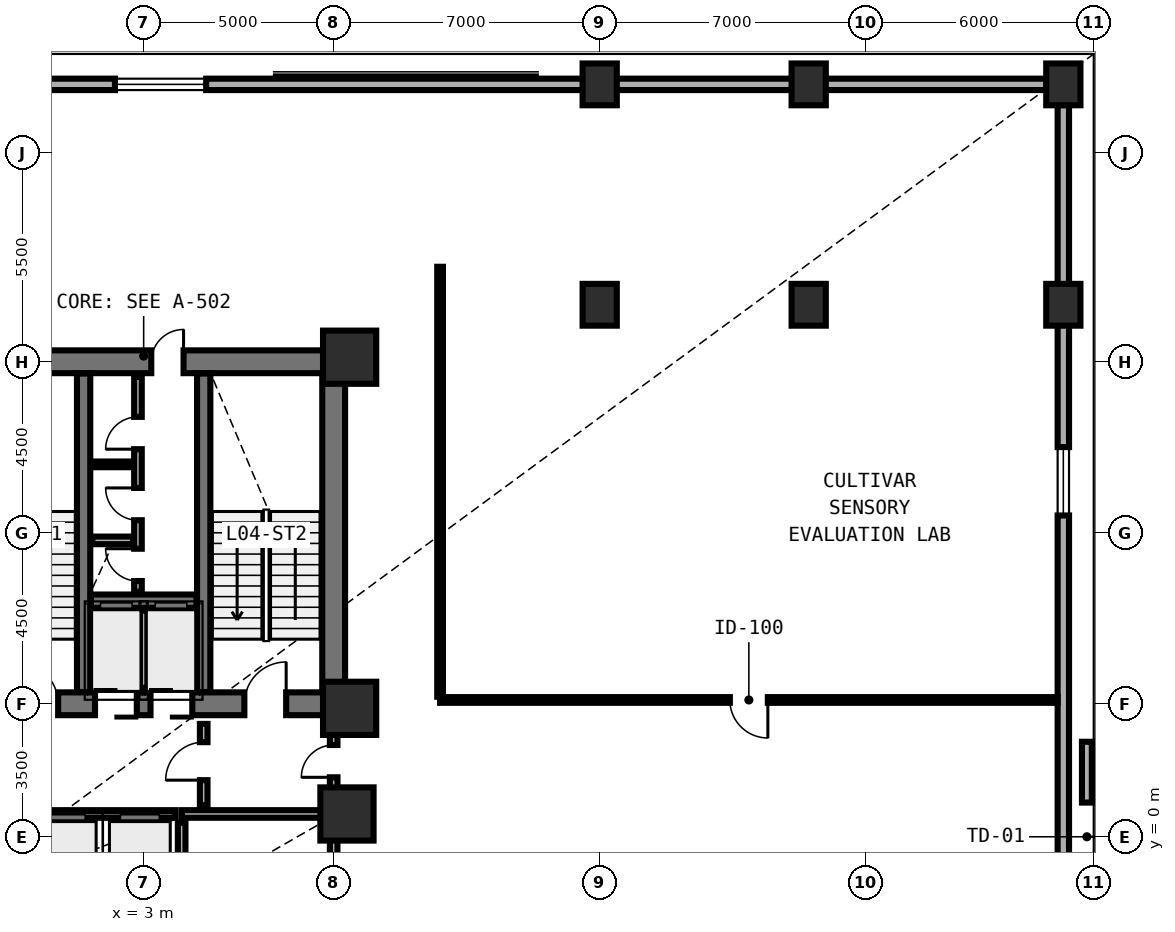
"""IFC4 building model, lengths in metres.
Left out: names, types, materials, properties, quantities, classifications, styles, units other than length and angle.
Written with IfcOpenShell. Run it as: python <this file> out.ifc"""

import sys

from ifc_helpers import new_model, si_unit, direction, frame, frame_2d, origin, origin_2d, place, context, subcontext, project, spatial, rectangle, extrude, element, fill, save


model = new_model("IFC4")
c1 = context("Model", 3, precision=1e-05, world=origin(), true_north=direction((0.0, 1.0)))
c2 = subcontext(c1, "Body", "Model", "MODEL_VIEW")
j1 = project(units=[si_unit("LENGTHUNIT", "METRE"), si_unit("PLANEANGLEUNIT", "RADIAN")], contexts=[c1])
p1 = place(None, origin())
s1 = spatial("IfcSite", under=j1, at=p1, CompositionType="ELEMENT")
p2 = place(p1, origin())
s2 = spatial("IfcBuilding", under=s1, at=p2, CompositionType="ELEMENT")
p3 = place(p2, frame((0.0, 0.0, 18.4)))
s3 = spatial("IfcBuildingStorey", under=s2, at=p3, CompositionType="ELEMENT", Elevation=18.4)
p4 = place(p3, frame((-2.0, 3.5, 0.0), z_axis=(0.0, 0.0, 1.0), x_axis=(1.0, 0.0, 0.0)))
e1 = element("IfcWall", 1, at=p4, inside=s3, PredefinedType="SHEAR", context=c2, shape_type="SweptSolid", body=[
    extrude(rectangle(XDim=10.0, YDim=0.6, at=frame_2d((5.0, 0.0))), origin(), (0.0, 0.0, 1.0), 4.592),
])
p5 = place(p4, frame((1.65, 0.0, 0.0)))
e2 = element("IfcOpeningElement", 2, at=p5, cuts=e1, PredefinedType="OPENING", context=c2, shape_type="SweptSolid", body=[
    extrude(rectangle(XDim=1.1, YDim=2.15, at=frame_2d((0.55, 1.075))), frame((0.0, 0.31, 0.0), z_axis=(0.0, -1.0, 0.0), x_axis=(1.0, 0.0, 0.0)), (0.0, 0.0, 1.0), 0.62),
])
p6 = place(p4, frame((7.65, 0.0, 0.0)))
e3 = element("IfcOpeningElement", 3, at=p6, cuts=e1, PredefinedType="OPENING", context=c2, shape_type="SweptSolid", body=[
    extrude(rectangle(XDim=1.1, YDim=2.15, at=frame_2d((0.55, 1.075))), frame((0.0, 0.31, 0.0), z_axis=(0.0, -1.0, 0.0), x_axis=(1.0, 0.0, 0.0)), (0.0, 0.0, 1.0), 0.62),
])
p7 = place(p4, frame((3.72, 0.0, 0.0)))
e4 = element("IfcOpeningElement", 4, at=p7, cuts=e1, PredefinedType="OPENING", context=c2, shape_type="SweptSolid", body=[
    extrude(rectangle(XDim=1.1, YDim=2.2, at=frame_2d((0.55, 1.1))), frame((0.0, 0.31, 0.0), z_axis=(0.0, -1.0, 0.0), x_axis=(1.0, 0.0, 0.0)), (0.0, 0.0, 1.0), 0.62),
])
p8 = place(p4, frame((5.18, 0.0, 0.0)))
e5 = element("IfcOpeningElement", 5, at=p8, cuts=e1, PredefinedType="OPENING", context=c2, shape_type="SweptSolid", body=[
    extrude(rectangle(XDim=1.1, YDim=2.2, at=frame_2d((0.55, 1.1))), frame((0.0, 0.31, 0.0), z_axis=(0.0, -1.0, 0.0), x_axis=(1.0, 0.0, 0.0)), (0.0, 0.0, 1.0), 0.62),
])
p9 = place(p3, frame((-2.0, 12.5, 0.0), z_axis=(0.0, 0.0, 1.0), x_axis=(1.0, 0.0, 0.0)))
e6 = element("IfcWall", 6, at=p9, inside=s3, PredefinedType="SHEAR", context=c2, shape_type="SweptSolid", body=[
    extrude(rectangle(XDim=10.0, YDim=0.6, at=frame_2d((5.0, 0.0))), origin(), (0.0, 0.0, 1.0), 4.592),
])
p10 = place(p9, frame((5.2, 0.0, 0.0)))
e7 = element("IfcOpeningElement", 7, at=p10, cuts=e6, PredefinedType="OPENING", context=c2, shape_type="SweptSolid", body=[
    extrude(rectangle(XDim=0.85, YDim=2.1, at=frame_2d((0.425, 1.05))), frame((0.0, 0.31, 0.0), z_axis=(0.0, -1.0, 0.0), x_axis=(1.0, 0.0, 0.0)), (0.0, 0.0, 1.0), 0.62),
])
p11 = place(p3, frame((8.0, 3.81, 0.0), z_axis=(0.0, 0.0, 1.0), x_axis=(0.0, 1.0, 0.0)))
e8 = element("IfcWall", 8, at=p11, inside=s3, PredefinedType="SHEAR", context=c2, shape_type="SweptSolid", body=[
    extrude(rectangle(XDim=8.38, YDim=0.6, at=frame_2d((4.19, 0.0))), origin(), (0.0, 0.0, 1.0), 4.592),
])
for number, where, z_axis, x_axis in (
    (9, (1.42, 3.81, 0.0), (0.0, 0.0, 1.0), (0.0, 1.0, 0.0)),
    (10, (4.58, 3.81, 0.0), (0.0, 0.0, 1.0), (0.0, 1.0, 0.0)),
):
    element("IfcWall", number, at=place(p3, frame(where, z_axis=z_axis, x_axis=x_axis)), inside=s3, PredefinedType="SHEAR", context=c2, shape_type="SweptSolid", body=[
        extrude(rectangle(XDim=8.38, YDim=0.35, at=frame_2d((4.19, 0.0))), origin(), (0.0, 0.0, 1.0), 4.592),
    ])
p12 = place(p3, frame((1.61, 6.2, 0.0), z_axis=(0.0, 0.0, 1.0), x_axis=(1.0, 0.0, 0.0)))
e11 = element("IfcWall", 11, at=p12, inside=s3, PredefinedType="SHEAR", context=c2, shape_type="SweptSolid", body=[
    extrude(rectangle(XDim=2.78, YDim=0.35, at=frame_2d((1.39, 0.0))), origin(), (0.0, 0.0, 1.0), 4.592),
])
for number, where, z_axis, x_axis in (
    (12, (8.42, 12.62, 0.0), (0.0, 0.0, 1.0), (1.0, 0.0, 0.0)),
    (13, (8.42, 3.38, 0.0), (0.0, 0.0, 1.0), (1.0, 0.0, 0.0)),
    (14, (8.35, 0.6, 0.0), (0.0, 0.0, 1.0), (1.0, 0.0, 0.0)),
):
    element("IfcColumn", number, at=place(p3, frame(where, z_axis=z_axis, x_axis=x_axis)), inside=s3, PredefinedType="COLUMN", context=c2, shape_type="SweptSolid", body=[
        extrude(rectangle(XDim=1.4, YDim=1.4, at=origin_2d()), origin(), (0.0, 0.0, 1.0), 4.575),
    ])
for number, where, z_axis, x_axis in (
    (15, (15.0, 14.0, 0.0), (0.0, 0.0, 1.0), (1.0, 0.0, 0.0)),
    (16, (15.0, 19.8, 0.0), (0.0, 0.0, 1.0), (1.0, 0.0, 0.0)),
    (17, (20.5, 14.0, 0.0), (0.0, 0.0, 1.0), (1.0, 0.0, 0.0)),
    (18, (20.5, 19.8, 0.0), (0.0, 0.0, 1.0), (1.0, 0.0, 0.0)),
    (19, (27.2, 14.0, 0.0), (0.0, 0.0, 1.0), (1.0, 0.0, 0.0)),
    (20, (27.2, 19.8, 0.0), (0.0, 0.0, 1.0), (1.0, 0.0, 0.0)),
):
    element("IfcColumn", number, at=place(p3, frame(where, z_axis=z_axis, x_axis=x_axis)), inside=s3, PredefinedType="COLUMN", context=c2, shape_type="SweptSolid", body=[
        extrude(rectangle(XDim=0.9, YDim=1.1, at=origin_2d()), origin(), (0.0, 0.0, 1.0), 4.575),
    ])
p13 = place(p3, frame((-26.755, 19.8, 0.0), z_axis=(0.0, 0.0, 1.0), x_axis=(1.0, 0.0, 0.0)))
e21 = element("IfcWall", 21, at=p13, inside=s3, PredefinedType="SOLIDWALL", context=c2, shape_type="SweptSolid", body=[
    extrude(rectangle(XDim=53.51, YDim=0.3, at=frame_2d((26.755, 0.0))), origin(), (0.0, 0.0, 1.0), 3.35),
])
p14 = place(p13, frame((9.0, 0.0, 0.85)))
e22 = element("IfcOpeningElement", 22, at=p14, cuts=e21, PredefinedType="OPENING", context=c2, shape_type="SweptSolid", body=[
    extrude(rectangle(XDim=2.4, YDim=1.9, at=frame_2d((1.2, 0.95))), frame((0.0, 0.16, 0.0), z_axis=(0.0, -1.0, 0.0), x_axis=(1.0, 0.0, 0.0)), (0.0, 0.0, 1.0), 0.32),
])
p15 = place(p13, frame((16.0, 0.0, 0.85)))
e23 = element("IfcOpeningElement", 23, at=p15, cuts=e21, PredefinedType="OPENING", context=c2, shape_type="SweptSolid", body=[
    extrude(rectangle(XDim=2.4, YDim=1.9, at=frame_2d((1.2, 0.95))), frame((0.0, 0.16, 0.0), z_axis=(0.0, -1.0, 0.0), x_axis=(1.0, 0.0, 0.0)), (0.0, 0.0, 1.0), 0.32),
])
p16 = place(p13, frame((29.0, 0.0, 0.85)))
e24 = element("IfcOpeningElement", 24, at=p16, cuts=e21, PredefinedType="OPENING", context=c2, shape_type="SweptSolid", body=[
    extrude(rectangle(XDim=2.4, YDim=1.9, at=frame_2d((1.2, 0.95))), frame((0.0, 0.16, 0.0), z_axis=(0.0, -1.0, 0.0), x_axis=(1.0, 0.0, 0.0)), (0.0, 0.0, 1.0), 0.32),
])
p17 = place(p3, frame((27.2, 19.255, 0.0), z_axis=(0.0, 0.0, 1.0), x_axis=(0.0, -1.0, 0.0)))
e25 = element("IfcWall", 25, at=p17, inside=s3, PredefinedType="SOLIDWALL", context=c2, shape_type="SweptSolid", body=[
    extrude(rectangle(XDim=38.51, YDim=0.3, at=frame_2d((19.255, 0.0))), origin(), (0.0, 0.0, 1.0), 3.35),
])
p18 = place(p17, frame((9.0, 0.0, 0.85)))
e26 = element("IfcOpeningElement", 26, at=p18, cuts=e25, PredefinedType="OPENING", context=c2, shape_type="SweptSolid", body=[
    extrude(rectangle(XDim=1.8, YDim=1.9, at=frame_2d((0.9, 0.95))), frame((0.0, 0.16, 0.0), z_axis=(0.0, -1.0, 0.0), x_axis=(1.0, 0.0, 0.0)), (0.0, 0.0, 1.0), 0.32),
])
p19 = place(p17, frame((29.0, 0.0, 0.85)))
e27 = element("IfcOpeningElement", 27, at=p19, cuts=e25, PredefinedType="OPENING", context=c2, shape_type="SweptSolid", body=[
    extrude(rectangle(XDim=1.8, YDim=1.9, at=frame_2d((0.9, 0.95))), frame((0.0, 0.16, 0.0), z_axis=(0.0, -1.0, 0.0), x_axis=(1.0, 0.0, 0.0)), (0.0, 0.0, 1.0), 0.32),
])
p20 = place(p3, frame((27.82, 2.5, 0.0), z_axis=(0.0, 0.0, 1.0), x_axis=(0.0, -1.0, 0.0)))
e28 = element("IfcWall", 28, at=p20, inside=s3, PredefinedType="SOLIDWALL", context=c2, shape_type="SweptSolid", body=[
    extrude(rectangle(XDim=5.0, YDim=0.26, at=frame_2d((2.5, 0.0))), origin(), (0.0, 0.0, 1.0), 3.35),
])
p21 = place(p20, frame((1.6, 0.0, 0.0)))
e29 = element("IfcOpeningElement", 29, at=p21, cuts=e28, PredefinedType="OPENING", context=c2, shape_type="SweptSolid", body=[
    extrude(rectangle(XDim=1.8, YDim=2.25, at=frame_2d((0.9, 1.125))), frame((0.0, 0.14, 0.0), z_axis=(0.0, -1.0, 0.0), x_axis=(1.0, 0.0, 0.0)), (0.0, 0.0, 1.0), 0.28),
])
p22 = place(p3, frame((3.0, 3.92, 0.0), z_axis=(0.0, 0.0, 1.0), x_axis=(0.0, 1.0, 0.0)))
e30 = element("IfcWall", 30, at=p22, inside=s3, PredefinedType="SOLIDWALL", context=c2, shape_type="SweptSolid", body=[
    extrude(rectangle(XDim=2.03, YDim=0.2, at=frame_2d((1.015, 0.0))), origin(), (0.0, 0.0, 1.0), 4.28),
])
p23 = place(p3, frame((1.65, 7.8, 0.0), z_axis=(0.0, 0.0, 1.0), x_axis=(1.0, 0.0, 0.0)))
e31 = element("IfcWall", 31, at=p23, inside=s3, PredefinedType="SOLIDWALL", context=c2, shape_type="SweptSolid", body=[
    extrude(rectangle(XDim=1.07, YDim=0.2, at=frame_2d((0.535, 0.0))), origin(), (0.0, 0.0, 1.0), 4.28),
])
p24 = place(p3, frame((4.0, 0.6, 0.0), z_axis=(0.0, 0.0, 1.0), x_axis=(1.0, 0.0, 0.0)))
e32 = element("IfcWall", 32, at=p24, inside=s3, PredefinedType="SOLIDWALL", context=c2, shape_type="SweptSolid", body=[
    extrude(rectangle(XDim=3.88, YDim=0.2, at=frame_2d((1.94, 0.0))), origin(), (0.0, 0.0, 1.0), 3.362),
])
p25 = place(p3, frame((4.0, -1.57, 0.0), z_axis=(0.0, 0.0, 1.0), x_axis=(0.0, 1.0, 0.0)))
e33 = element("IfcWall", 33, at=p25, inside=s3, PredefinedType="SOLIDWALL", context=c2, shape_type="SweptSolid", body=[
    extrude(rectangle(XDim=1.94, YDim=0.2, at=frame_2d((0.97, 0.0))), origin(), (0.0, 0.0, 1.0), 4.28),
])
p26 = place(p3, frame((8.0, -1.57, 0.0), z_axis=(0.0, 0.0, 1.0), x_axis=(0.0, 1.0, 0.0)))
e34 = element("IfcWall", 34, at=p26, inside=s3, PredefinedType="SOLIDWALL", context=c2, shape_type="SweptSolid", body=[
    extrude(rectangle(XDim=2.05, YDim=0.2, at=frame_2d((1.025, 0.0))), origin(), (0.0, 0.0, 1.0), 3.362),
])
p27 = place(p3, frame((2.85, 6.45, 0.0), z_axis=(0.0, 0.0, 1.0), x_axis=(0.0, 1.0, 0.0)))
e35 = element("IfcWall", 35, at=p27, inside=s3, PredefinedType="MOVABLE", context=c2, shape_type="SweptSolid", body=[
    extrude(rectangle(XDim=5.65, YDim=0.2, at=frame_2d((2.825, 0.0))), origin(), (0.0, 0.0, 1.0), 4.28),
])
p28 = place(p27, frame((1.88, 0.0, 0.0)))
e36 = element("IfcOpeningElement", 36, at=p28, cuts=e35, PredefinedType="OPENING", context=c2, shape_type="SweptSolid", body=[
    extrude(rectangle(XDim=0.85, YDim=2.05, at=frame_2d((0.425, 1.025))), frame((0.0, 0.11, 0.0), z_axis=(0.0, -1.0, 0.0), x_axis=(1.0, 0.0, 0.0)), (0.0, 0.0, 1.0), 0.22),
])
p29 = place(p27, frame((3.75, 0.0, 0.0)))
e37 = element("IfcOpeningElement", 37, at=p29, cuts=e35, PredefinedType="OPENING", context=c2, shape_type="SweptSolid", body=[
    extrude(rectangle(XDim=0.85, YDim=2.1, at=frame_2d((0.425, 1.05))), frame((0.0, 0.11, 0.0), z_axis=(0.0, -1.0, 0.0), x_axis=(1.0, 0.0, 0.0)), (0.0, 0.0, 1.0), 0.22),
])
p30 = place(p27, frame((0.28, 0.0, 0.0)))
e38 = element("IfcOpeningElement", 38, at=p30, cuts=e35, PredefinedType="OPENING", context=c2, shape_type="SweptSolid", body=[
    extrude(rectangle(XDim=0.85, YDim=2.1, at=frame_2d((0.425, 1.05))), frame((0.0, 0.11, 0.0), z_axis=(0.0, -1.0, 0.0), x_axis=(1.0, 0.0, 0.0)), (0.0, 0.0, 1.0), 0.22),
])
p31 = place(p3, frame((4.58, 0.83, 0.0), z_axis=(0.0, 0.0, 1.0), x_axis=(0.0, 1.0, 0.0)))
e39 = element("IfcWall", 39, at=p31, inside=s3, PredefinedType="MOVABLE", context=c2, shape_type="SweptSolid", body=[
    extrude(rectangle(XDim=2.14, YDim=0.2, at=frame_2d((1.07, 0.0))), origin(), (0.0, 0.0, 1.0), 4.28),
])
p32 = place(p31, frame((0.66, 0.0, 0.0)))
e40 = element("IfcOpeningElement", 40, at=p32, cuts=e39, PredefinedType="OPENING", context=c2, shape_type="SweptSolid", body=[
    extrude(rectangle(XDim=1.0, YDim=2.1, at=frame_2d((0.5, 1.05))), frame((0.0, 0.11, 0.0), z_axis=(0.0, -1.0, 0.0), x_axis=(1.0, 0.0, 0.0)), (0.0, 0.0, 1.0), 0.22),
])
p33 = place(p3, frame((8.0, 0.72, 0.0), z_axis=(0.0, 0.0, 1.0), x_axis=(0.0, 1.0, 0.0)))
e41 = element("IfcWall", 41, at=p33, inside=s3, PredefinedType="MOVABLE", context=c2, shape_type="SweptSolid", body=[
    extrude(rectangle(XDim=2.25, YDim=0.2, at=frame_2d((1.125, 0.0))), origin(), (0.0, 0.0, 1.0), 3.512),
])
p34 = place(p33, frame((0.845, 0.0, 0.0)))
e42 = element("IfcOpeningElement", 42, at=p34, cuts=e41, PredefinedType="OPENING", context=c2, shape_type="SweptSolid", body=[
    extrude(rectangle(XDim=0.85, YDim=2.1, at=frame_2d((0.425, 1.05))), frame((0.0, 0.11, 0.0), z_axis=(0.0, -1.0, 0.0), x_axis=(1.0, 0.0, 0.0)), (0.0, 0.0, 1.0), 0.22),
])
p35 = place(p3, frame((27.05, 3.6, 0.0), z_axis=(0.0, 0.0, 1.0), x_axis=(-1.0, 0.0, 0.0)))
e43 = element("IfcWall", 43, at=p35, inside=s3, PredefinedType="PARTITIONING", context=c2, shape_type="SweptSolid", body=[
    extrude(rectangle(XDim=16.25, YDim=0.15, at=frame_2d((8.125, 0.0))), origin(), (0.0, 0.0, 1.0), 4.28),
])
p36 = place(p35, frame((7.625, 0.0, 0.0)))
e44 = element("IfcOpeningElement", 44, at=p36, cuts=e43, PredefinedType="OPENING", context=c2, shape_type="SweptSolid", body=[
    extrude(rectangle(XDim=1.0, YDim=2.1, at=frame_2d((0.5, 1.05))), frame((0.0, 0.085, 0.0), z_axis=(0.0, -1.0, 0.0), x_axis=(1.0, 0.0, 0.0)), (0.0, 0.0, 1.0), 0.17),
])
p37 = place(p3, frame((1.65, 9.8, 0.0), z_axis=(0.0, 0.0, 1.0), x_axis=(1.0, 0.0, 0.0)))
e45 = element("IfcWall", 45, at=p37, inside=s3, PredefinedType="PARTITIONING", context=c2, shape_type="SweptSolid", body=[
    extrude(rectangle(XDim=0.96, YDim=0.15, at=frame_2d((0.48, 0.0))), origin(), (0.0, 0.0, 1.0), 4.28),
])
p38 = place(p3, frame((-1.88, 0.6, 0.0), z_axis=(0.0, 0.0, 1.0), x_axis=(1.0, 0.0, 0.0)))
e46 = element("IfcWall", 46, at=p38, inside=s3, PredefinedType="MOVABLE", context=c2, shape_type="SweptSolid", body=[
    extrude(rectangle(XDim=5.72, YDim=0.2, at=frame_2d((2.86, 0.0))), origin(), (0.0, 0.0, 1.0), 3.362),
])
p39 = place(p3, frame((10.8, 3.685, 0.0), z_axis=(0.0, 0.0, 1.0), x_axis=(0.0, 1.0, 0.0)))
e47 = element("IfcWall", 47, at=p39, inside=s3, PredefinedType="PARTITIONING", context=c2, shape_type="SweptSolid", body=[
    extrude(rectangle(XDim=11.315, YDim=0.15, at=frame_2d((5.657, 0.0))), origin(), (0.0, 0.0, 1.0), 4.28),
])
p40 = place(p16, origin())
e48 = element("IfcWindow", 48, at=p40, inside=s3, PartitioningType="SINGLE_PANEL", PredefinedType="WINDOW", context=c2, shape_type="SweptSolid", body=[
    extrude(rectangle(XDim=2.4, YDim=1.9, at=frame_2d((1.2, 0.95))), frame((0.0, 0.03, 0.0), z_axis=(0.0, -1.0, 0.0), x_axis=(1.0, 0.0, 0.0)), (0.0, 0.0, 1.0), 0.06),
])
fill(e24, e48)
p41 = place(p18, origin())
e49 = element("IfcWindow", 49, at=p41, inside=s3, PartitioningType="SINGLE_PANEL", PredefinedType="WINDOW", context=c2, shape_type="SweptSolid", body=[
    extrude(rectangle(XDim=1.8, YDim=1.9, at=frame_2d((0.9, 0.95))), frame((0.0, 0.03, 0.0), z_axis=(0.0, -1.0, 0.0), x_axis=(1.0, 0.0, 0.0)), (0.0, 0.0, 1.0), 0.06),
])
fill(e26, e49)
p42 = place(p21, origin())
e50 = element("IfcDoor", 50, at=p42, inside=s3, OperationType="DOUBLE_DOOR_SINGLE_SWING", PredefinedType="DOOR", context=c2, shape_type="SweptSolid", body=[
    extrude(rectangle(XDim=1.8, YDim=2.25, at=frame_2d((0.9, 1.125))), frame((0.0, 0.025, 0.0), z_axis=(0.0, -1.0, 0.0), x_axis=(1.0, 0.0, 0.0)), (0.0, 0.0, 1.0), 0.05),
])
fill(e29, e50)
p43 = place(p5, origin())
e51 = element("IfcDoor", 51, at=p43, inside=s3, OperationType="SINGLE_SWING_LEFT", PredefinedType="DOOR", context=c2, shape_type="SweptSolid", body=[
    extrude(rectangle(XDim=1.1, YDim=2.15, at=frame_2d((0.55, 1.075))), frame((0.0, 0.025, 0.0), z_axis=(0.0, -1.0, 0.0), x_axis=(1.0, 0.0, 0.0)), (0.0, 0.0, 1.0), 0.05),
])
fill(e2, e51)
p44 = place(p6, origin())
e52 = element("IfcDoor", 52, at=p44, inside=s3, OperationType="SINGLE_SWING_RIGHT", PredefinedType="DOOR", context=c2, shape_type="SweptSolid", body=[
    extrude(rectangle(XDim=1.1, YDim=2.15, at=frame_2d((0.55, 1.075))), frame((0.0, 0.025, 0.0), z_axis=(0.0, -1.0, 0.0), x_axis=(1.0, 0.0, 0.0)), (0.0, 0.0, 1.0), 0.05),
])
fill(e3, e52)
p45 = place(p7, origin())
e53 = element("IfcDoor", 53, at=p45, inside=s3, OperationType="DOUBLE_DOOR_SLIDING", PredefinedType="DOOR", context=c2, shape_type="SweptSolid", body=[
    extrude(rectangle(XDim=1.1, YDim=2.2, at=frame_2d((0.55, 1.1))), frame((0.0, 0.025, 0.0), z_axis=(0.0, -1.0, 0.0), x_axis=(1.0, 0.0, 0.0)), (0.0, 0.0, 1.0), 0.05),
])
fill(e4, e53)
p46 = place(p8, origin())
e54 = element("IfcDoor", 54, at=p46, inside=s3, OperationType="DOUBLE_DOOR_SLIDING", PredefinedType="DOOR", context=c2, shape_type="SweptSolid", body=[
    extrude(rectangle(XDim=1.1, YDim=2.2, at=frame_2d((0.55, 1.1))), frame((0.0, 0.025, 0.0), z_axis=(0.0, -1.0, 0.0), x_axis=(1.0, 0.0, 0.0)), (0.0, 0.0, 1.0), 0.05),
])
fill(e5, e54)
p47 = place(p10, origin())
e55 = element("IfcDoor", 55, at=p47, inside=s3, OperationType="SINGLE_SWING_RIGHT", PredefinedType="DOOR", context=c2, shape_type="SweptSolid", body=[
    extrude(rectangle(XDim=0.85, YDim=2.1, at=frame_2d((0.425, 1.05))), frame((0.0, 0.025, 0.0), z_axis=(0.0, -1.0, 0.0), x_axis=(1.0, 0.0, 0.0)), (0.0, 0.0, 1.0), 0.05),
])
fill(e7, e55)
p48 = place(p28, origin())
e56 = element("IfcDoor", 56, at=p48, inside=s3, OperationType="SINGLE_SWING_RIGHT", PredefinedType="DOOR", context=c2, shape_type="SweptSolid", body=[
    extrude(rectangle(XDim=0.85, YDim=2.05, at=frame_2d((0.425, 1.025))), frame((0.0, 0.025, 0.0), z_axis=(0.0, -1.0, 0.0), x_axis=(1.0, 0.0, 0.0)), (0.0, 0.0, 1.0), 0.05),
])
fill(e36, e56)
p49 = place(p29, origin())
e57 = element("IfcDoor", 57, at=p49, inside=s3, OperationType="SINGLE_SWING_LEFT", PredefinedType="DOOR", context=c2, shape_type="SweptSolid", body=[
    extrude(rectangle(XDim=0.85, YDim=2.1, at=frame_2d((0.425, 1.05))), frame((0.0, 0.025, 0.0), z_axis=(0.0, -1.0, 0.0), x_axis=(1.0, 0.0, 0.0)), (0.0, 0.0, 1.0), 0.05),
])
fill(e37, e57)
p50 = place(p30, origin())
e58 = element("IfcDoor", 58, at=p50, inside=s3, OperationType="SINGLE_SWING_RIGHT", PredefinedType="DOOR", context=c2, shape_type="SweptSolid", body=[
    extrude(rectangle(XDim=0.85, YDim=2.1, at=frame_2d((0.425, 1.05))), frame((0.0, 0.025, 0.0), z_axis=(0.0, -1.0, 0.0), x_axis=(1.0, 0.0, 0.0)), (0.0, 0.0, 1.0), 0.05),
])
fill(e38, e58)
p51 = place(p32, origin())
e59 = element("IfcDoor", 59, at=p51, inside=s3, OperationType="SINGLE_SWING_LEFT", PredefinedType="DOOR", context=c2, shape_type="SweptSolid", body=[
    extrude(rectangle(XDim=1.0, YDim=2.1, at=frame_2d((0.5, 1.05))), frame((0.0, 0.025, 0.0), z_axis=(0.0, -1.0, 0.0), x_axis=(1.0, 0.0, 0.0)), (0.0, 0.0, 1.0), 0.05),
])
fill(e40, e59)
p52 = place(p34, origin())
e60 = element("IfcDoor", 60, at=p52, inside=s3, OperationType="SINGLE_SWING_LEFT", PredefinedType="DOOR", context=c2, shape_type="SweptSolid", body=[
    extrude(rectangle(XDim=0.85, YDim=2.1, at=frame_2d((0.425, 1.05))), frame((0.0, 0.025, 0.0), z_axis=(0.0, -1.0, 0.0), x_axis=(1.0, 0.0, 0.0)), (0.0, 0.0, 1.0), 0.05),
])
fill(e42, e60)
p53 = place(p36, origin())
e61 = element("IfcDoor", 61, at=p53, inside=s3, OperationType="SINGLE_SWING_LEFT", PredefinedType="DOOR", context=c2, shape_type="SweptSolid", body=[
    extrude(rectangle(XDim=1.0, YDim=2.1, at=frame_2d((0.5, 1.05))), frame((0.0, 0.025, 0.0), z_axis=(0.0, -1.0, 0.0), x_axis=(1.0, 0.0, 0.0)), (0.0, 0.0, 1.0), 0.05),
])
fill(e44, e61)
save(model, sys.argv[1])
